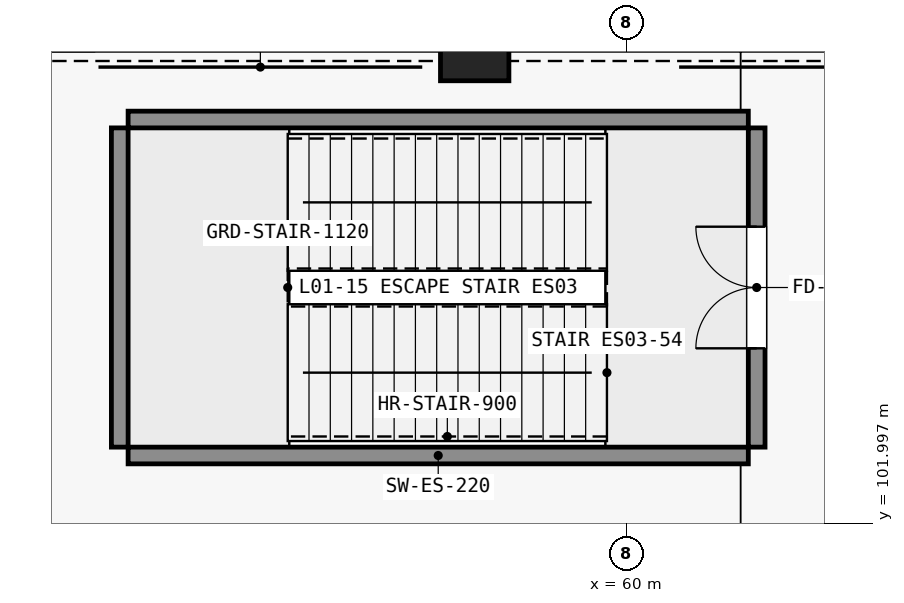
"""IFC4 building model, lengths in metres.
Left out: names, types, materials, properties, quantities, classifications, styles, units other than length and angle.
Written with IfcOpenShell. Run it as: python <this file> out.ifc"""

import sys

from ifc_helpers import new_model, si_unit, direction, frame, frame_2d, origin, origin_2d, place, context, subcontext, project, spatial, rectangle, extrude, element, fill, save


model = new_model("IFC4")
c1 = context("Model", 3, precision=1e-05, world=origin(), true_north=direction((0.0, 1.0)))
c2 = subcontext(c1, "Body", "Model", "MODEL_VIEW")
j1 = project(units=[si_unit("LENGTHUNIT", "METRE"), si_unit("PLANEANGLEUNIT", "RADIAN")], contexts=[c1])
p1 = place(None, origin())
s1 = spatial("IfcSite", under=j1, at=p1, CompositionType="ELEMENT")
p2 = place(p1, origin())
s2 = spatial("IfcBuilding", under=s1, at=p2, CompositionType="ELEMENT")
p3 = place(p2, frame((0.0, 0.0, 6.0)))
s3 = spatial("IfcBuildingStorey", under=s2, at=p3, CompositionType="ELEMENT", Elevation=6.0)
p4 = place(p3, frame((58.0, 108.42, 0.0), z_axis=(0.0, 0.0, 1.0), x_axis=(1.0, 0.0, 0.0)))
e1 = element("IfcColumn", 1, at=p4, inside=s3, PredefinedType="PILASTER", context=c2, shape_type="SweptSolid", body=[
    extrude(rectangle(XDim=0.9, YDim=1.2, at=origin_2d()), origin(), (0.0, 0.0, 1.0), 5.4),
])
for number, where, z_axis, x_axis in (
    (2, (53.44, 102.89, 0.0), (0.0, 0.0, 1.0), (1.0, 0.0, 0.0)),
    (3, (53.44, 107.31, 0.0), (0.0, 0.0, 1.0), (1.0, 0.0, 0.0)),
):
    element("IfcWall", number, at=place(p3, frame(where, z_axis=z_axis, x_axis=x_axis)), inside=s3, PredefinedType="SHEAR", context=c2, shape_type="SweptSolid", body=[
        extrude(rectangle(XDim=8.16, YDim=0.22, at=frame_2d((4.08, 0.0))), origin(), (0.0, 0.0, 1.0), 5.4),
    ])
p5 = place(p3, frame((53.33, 103.0, 0.0), z_axis=(0.0, 0.0, 1.0), x_axis=(0.0, 1.0, 0.0)))
e4 = element("IfcWall", 4, at=p5, inside=s3, PredefinedType="SHEAR", context=c2, shape_type="SweptSolid", body=[
    extrude(rectangle(XDim=4.2, YDim=0.22, at=frame_2d((2.1, 0.0))), origin(), (0.0, 0.0, 1.0), 5.4),
])
p6 = place(p3, frame((61.71, 103.0, 0.0), z_axis=(0.0, 0.0, 1.0), x_axis=(0.0, 1.0, 0.0)))
e5 = element("IfcWall", 5, at=p6, inside=s3, PredefinedType="SHEAR", context=c2, shape_type="SweptSolid", body=[
    extrude(rectangle(XDim=4.2, YDim=0.22, at=frame_2d((2.1, 0.0))), origin(), (0.0, 0.0, 1.0), 5.4),
])
p7 = place(p6, frame((1.3, 0.0, 0.0)))
e6 = element("IfcOpeningElement", 6, at=p7, cuts=e5, PredefinedType="OPENING", context=c2, shape_type="SweptSolid", body=[
    extrude(rectangle(XDim=1.6, YDim=2.2, at=frame_2d((0.8, 1.1))), frame((0.0, 0.12, 0.0), z_axis=(0.0, -1.0, 0.0), x_axis=(1.0, 0.0, 0.0)), (0.0, 0.0, 1.0), 0.24),
])
p8 = place(p7, origin())
e7 = element("IfcDoor", 7, at=p8, inside=s3, OperationType="DOUBLE_DOOR_SINGLE_SWING", PredefinedType="DOOR", context=c2, shape_type="SweptSolid", body=[
    extrude(rectangle(XDim=1.6, YDim=2.2, at=frame_2d((0.8, 1.1))), frame((0.0, 0.025, 0.0), z_axis=(0.0, -1.0, 0.0), x_axis=(1.0, 0.0, 0.0)), (0.0, 0.0, 1.0), 0.05),
])
fill(e6, e7)
save(model, sys.argv[1])
